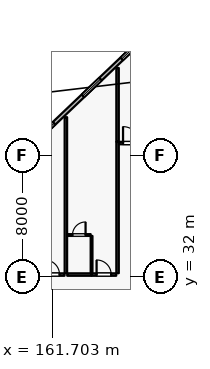
"""IFC4 building model, lengths in metres.
Left out: names, types, materials, properties, quantities, classifications, styles, units other than length and angle.
Written with IfcOpenShell. Run it as: python <this file> out.ifc"""

import sys

from ifc_helpers import new_model, si_unit, direction, frame, frame_2d, origin, place, context, subcontext, project, spatial, rectangle, extrude, element, fill, save


model = new_model("IFC4")
c1 = context("Model", 3, precision=1e-05, world=origin(), true_north=direction((0.0, 1.0)))
c2 = subcontext(c1, "Body", "Model", "MODEL_VIEW")
j1 = project(units=[si_unit("LENGTHUNIT", "METRE"), si_unit("PLANEANGLEUNIT", "RADIAN")], contexts=[c1])
p1 = place(None, origin())
s1 = spatial("IfcSite", under=j1, at=p1, CompositionType="ELEMENT")
p2 = place(p1, origin())
s2 = spatial("IfcBuilding", under=s1, at=p2, CompositionType="ELEMENT")
p3 = place(p2, frame((0.0, 0.0, 21.0)))
s3 = spatial("IfcBuildingStorey", under=s2, at=p3, CompositionType="ELEMENT", Elevation=21.0)
p4 = place(p3, frame((160.0, 40.381, 0.0), z_axis=(0.0, 0.0, 1.0), x_axis=(0.724156739794, 0.689635422677, 0.0)))
e1 = element("IfcWall", 1, at=p4, inside=s3, PredefinedType="SOLIDWALL", context=c2, shape_type="SweptSolid", body=[
    extrude(rectangle(XDim=10.495, YDim=0.24, at=frame_2d((5.248, 0.0))), origin(), (0.0, 0.0, 1.0), 3.53),
])
p5 = place(p4, frame((0.926, 0.0, 0.8)))
e2 = element("IfcOpeningElement", 2, at=p5, cuts=e1, PredefinedType="OPENING", context=c2, shape_type="SweptSolid", body=[
    extrude(rectangle(XDim=1.6, YDim=1.6, at=frame_2d((0.8, 0.8))), frame((0.0, 0.13, 0.0), z_axis=(0.0, -1.0, 0.0), x_axis=(1.0, 0.0, 0.0)), (0.0, 0.0, 1.0), 0.26),
])
p6 = place(p4, frame((5.138, 0.0, 0.8)))
e3 = element("IfcOpeningElement", 3, at=p6, cuts=e1, PredefinedType="OPENING", context=c2, shape_type="SweptSolid", body=[
    extrude(rectangle(XDim=1.6, YDim=1.6, at=frame_2d((0.8, 0.8))), frame((0.0, 0.13, 0.0), z_axis=(0.0, -1.0, 0.0), x_axis=(1.0, 0.0, 0.0)), (0.0, 0.0, 1.0), 0.26),
])
p7 = place(p4, frame((8.659, 0.0, 0.8)))
e4 = element("IfcOpeningElement", 4, at=p7, cuts=e1, PredefinedType="OPENING", context=c2, shape_type="SweptSolid", body=[
    extrude(rectangle(XDim=1.6, YDim=1.6, at=frame_2d((0.8, 0.8))), frame((0.0, 0.13, 0.0), z_axis=(0.0, -1.0, 0.0), x_axis=(1.0, 0.0, 0.0)), (0.0, 0.0, 1.0), 0.26),
])
p8 = place(p3, frame((160.89, 32.17, 0.0), z_axis=(0.0, 0.0, 1.0), x_axis=(1.0, 0.0, 0.0)))
e5 = element("IfcWall", 5, at=p8, inside=s3, PredefinedType="PARTITIONING", context=c2, shape_type="SweptSolid", body=[
    extrude(rectangle(XDim=1.62, YDim=0.16, at=frame_2d((0.81, 0.0))), origin(), (0.0, 0.0, 1.0), 3.965),
])
p9 = place(p8, frame((0.33, 0.0, 0.0)))
e6 = element("IfcOpeningElement", 6, at=p9, cuts=e5, PredefinedType="OPENING", context=c2, shape_type="SweptSolid", body=[
    extrude(rectangle(XDim=0.96, YDim=2.2, at=frame_2d((0.48, 1.1))), frame((0.0, 0.09, 0.0), z_axis=(0.0, -1.0, 0.0), x_axis=(1.0, 0.0, 0.0)), (0.0, 0.0, 1.0), 0.18),
])
p10 = place(p3, frame((162.69, 32.17, 0.0), z_axis=(0.0, 0.0, 1.0), x_axis=(1.0, 0.0, 0.0)))
e7 = element("IfcWall", 7, at=p10, inside=s3, PredefinedType="PARTITIONING", context=c2, shape_type="SweptSolid", body=[
    extrude(rectangle(XDim=1.59, YDim=0.16, at=frame_2d((0.795, 0.0))), origin(), (0.0, 0.0, 1.0), 3.965),
])
p11 = place(p3, frame((164.29, 32.17, 0.0), z_axis=(0.0, 0.0, 1.0), x_axis=(1.0, 0.0, 0.0)))
e8 = element("IfcWall", 8, at=p11, inside=s3, PredefinedType="PARTITIONING", context=c2, shape_type="SweptSolid", body=[
    extrude(rectangle(XDim=1.62, YDim=0.16, at=frame_2d((0.81, 0.0))), origin(), (0.0, 0.0, 1.0), 3.965),
])
p12 = place(p11, frame((0.33, 0.0, 0.0)))
e9 = element("IfcOpeningElement", 9, at=p12, cuts=e8, PredefinedType="OPENING", context=c2, shape_type="SweptSolid", body=[
    extrude(rectangle(XDim=0.96, YDim=2.2, at=frame_2d((0.48, 1.1))), frame((0.0, 0.09, 0.0), z_axis=(0.0, -1.0, 0.0), x_axis=(1.0, 0.0, 0.0)), (0.0, 0.0, 1.0), 0.18),
])
p13 = place(p3, frame((164.29, 32.26, 0.0), z_axis=(0.0, 0.0, 1.0), x_axis=(0.0, 1.0, 0.0)))
e10 = element("IfcWall", 10, at=p13, inside=s3, PredefinedType="PARTITIONING", context=c2, shape_type="SweptSolid", body=[
    extrude(rectangle(XDim=2.45, YDim=0.115, at=frame_2d((1.225, 0.0))), origin(), (0.0, 0.0, 1.0), 3.965),
])
p14 = place(p3, frame((162.7, 34.77, 0.0), z_axis=(0.0, 0.0, 1.0), x_axis=(1.0, 0.0, 0.0)))
e11 = element("IfcWall", 11, at=p14, inside=s3, PredefinedType="PARTITIONING", context=c2, shape_type="SweptSolid", body=[
    extrude(rectangle(XDim=1.53, YDim=0.115, at=frame_2d((0.765, 0.0))), origin(), (0.0, 0.0, 1.0), 3.965),
])
p15 = place(p14, frame((0.335, 0.0, 0.0)))
e12 = element("IfcOpeningElement", 12, at=p15, cuts=e11, PredefinedType="OPENING", context=c2, shape_type="SweptSolid", body=[
    extrude(rectangle(XDim=0.86, YDim=2.12, at=frame_2d((0.43, 1.06))), frame((0.0, 0.067, 0.0), z_axis=(0.0, -1.0, 0.0), x_axis=(1.0, 0.0, 0.0)), (0.0, 0.0, 1.0), 0.135),
])
p16 = place(p3, frame((162.6, 32.26, 0.0), z_axis=(0.0, 0.0, 1.0), x_axis=(0.0, 1.0, 0.0)))
e13 = element("IfcWall", 13, at=p16, inside=s3, PredefinedType="PARTITIONING", context=c2, shape_type="SweptSolid", body=[
    extrude(rectangle(XDim=10.26, YDim=0.16, at=frame_2d((5.13, 0.0))), origin(), (0.0, 0.0, 1.0), 3.965),
])
p17 = place(p3, frame((166.0, 32.26, 0.0), z_axis=(0.0, 0.0, 1.0), x_axis=(0.0, 1.0, 0.0)))
e14 = element("IfcWall", 14, at=p17, inside=s3, PredefinedType="PARTITIONING", context=c2, shape_type="SweptSolid", body=[
    extrude(rectangle(XDim=8.64, YDim=0.16, at=frame_2d((4.32, 0.0))), origin(), (0.0, 0.0, 1.0), 3.965),
])
p18 = place(p3, frame((166.09, 40.82, 0.0), z_axis=(0.0, 0.0, 1.0), x_axis=(1.0, 0.0, 0.0)))
e15 = element("IfcWall", 15, at=p18, inside=s3, PredefinedType="PARTITIONING", context=c2, shape_type="SweptSolid", body=[
    extrude(rectangle(XDim=1.62, YDim=0.16, at=frame_2d((0.81, 0.0))), origin(), (0.0, 0.0, 1.0), 3.965),
])
p19 = place(p18, frame((0.27, 0.0, 0.0)))
e16 = element("IfcOpeningElement", 16, at=p19, cuts=e15, PredefinedType="OPENING", context=c2, shape_type="SweptSolid", body=[
    extrude(rectangle(XDim=1.08, YDim=2.3, at=frame_2d((0.54, 1.15))), frame((0.0, 0.09, 0.0), z_axis=(0.0, -1.0, 0.0), x_axis=(1.0, 0.0, 0.0)), (0.0, 0.0, 1.0), 0.18),
])
p20 = place(p3, frame((166.0, 40.91, 0.0), z_axis=(0.0, 0.0, 1.0), x_axis=(0.0, 1.0, 0.0)))
e17 = element("IfcWall", 17, at=p20, inside=s3, PredefinedType="PARTITIONING", context=c2, shape_type="SweptSolid", body=[
    extrude(rectangle(XDim=4.85, YDim=0.16, at=frame_2d((2.425, 0.0))), origin(), (0.0, 0.0, 1.0), 3.965),
])
p21 = place(p5, origin())
e18 = element("IfcWindow", 18, at=p21, inside=s3, PartitioningType="SINGLE_PANEL", PredefinedType="WINDOW", context=c2, shape_type="SweptSolid", body=[
    extrude(rectangle(XDim=1.6, YDim=1.6, at=frame_2d((0.8, 0.8))), frame((0.0, 0.03, 0.0), z_axis=(0.0, -1.0, 0.0), x_axis=(1.0, 0.0, 0.0)), (0.0, 0.0, 1.0), 0.06),
])
fill(e2, e18)
p22 = place(p6, origin())
e19 = element("IfcWindow", 19, at=p22, inside=s3, PartitioningType="SINGLE_PANEL", PredefinedType="WINDOW", context=c2, shape_type="SweptSolid", body=[
    extrude(rectangle(XDim=1.6, YDim=1.6, at=frame_2d((0.8, 0.8))), frame((0.0, 0.03, 0.0), z_axis=(0.0, -1.0, 0.0), x_axis=(1.0, 0.0, 0.0)), (0.0, 0.0, 1.0), 0.06),
])
fill(e3, e19)
p23 = place(p7, origin())
e20 = element("IfcWindow", 20, at=p23, inside=s3, PartitioningType="SINGLE_PANEL", PredefinedType="WINDOW", context=c2, shape_type="SweptSolid", body=[
    extrude(rectangle(XDim=1.6, YDim=1.6, at=frame_2d((0.8, 0.8))), frame((0.0, 0.03, 0.0), z_axis=(0.0, -1.0, 0.0), x_axis=(1.0, 0.0, 0.0)), (0.0, 0.0, 1.0), 0.06),
])
fill(e4, e20)
p24 = place(p9, origin())
e21 = element("IfcDoor", 21, at=p24, inside=s3, OperationType="SINGLE_SWING_LEFT", PredefinedType="DOOR", context=c2, shape_type="SweptSolid", body=[
    extrude(rectangle(XDim=0.96, YDim=2.2, at=frame_2d((0.48, 1.1))), frame((0.0, 0.025, 0.0), z_axis=(0.0, -1.0, 0.0), x_axis=(1.0, 0.0, 0.0)), (0.0, 0.0, 1.0), 0.05),
])
fill(e6, e21)
p25 = place(p12, origin())
e22 = element("IfcDoor", 22, at=p25, inside=s3, OperationType="SINGLE_SWING_LEFT", PredefinedType="DOOR", context=c2, shape_type="SweptSolid", body=[
    extrude(rectangle(XDim=0.96, YDim=2.2, at=frame_2d((0.48, 1.1))), frame((0.0, 0.025, 0.0), z_axis=(0.0, -1.0, 0.0), x_axis=(1.0, 0.0, 0.0)), (0.0, 0.0, 1.0), 0.05),
])
fill(e9, e22)
p26 = place(p15, origin())
e23 = element("IfcDoor", 23, at=p26, inside=s3, OperationType="SINGLE_SWING_RIGHT", PredefinedType="DOOR", context=c2, shape_type="SweptSolid", body=[
    extrude(rectangle(XDim=0.86, YDim=2.12, at=frame_2d((0.43, 1.06))), frame((0.0, 0.025, 0.0), z_axis=(0.0, -1.0, 0.0), x_axis=(1.0, 0.0, 0.0)), (0.0, 0.0, 1.0), 0.05),
])
fill(e12, e23)
p27 = place(p19, origin())
e24 = element("IfcDoor", 24, at=p27, inside=s3, OperationType="SINGLE_SWING_LEFT", PredefinedType="DOOR", context=c2, shape_type="SweptSolid", body=[
    extrude(rectangle(XDim=1.08, YDim=2.3, at=frame_2d((0.54, 1.15))), frame((0.0, 0.025, 0.0), z_axis=(0.0, -1.0, 0.0), x_axis=(1.0, 0.0, 0.0)), (0.0, 0.0, 1.0), 0.05),
])
fill(e16, e24)
save(model, sys.argv[1])
